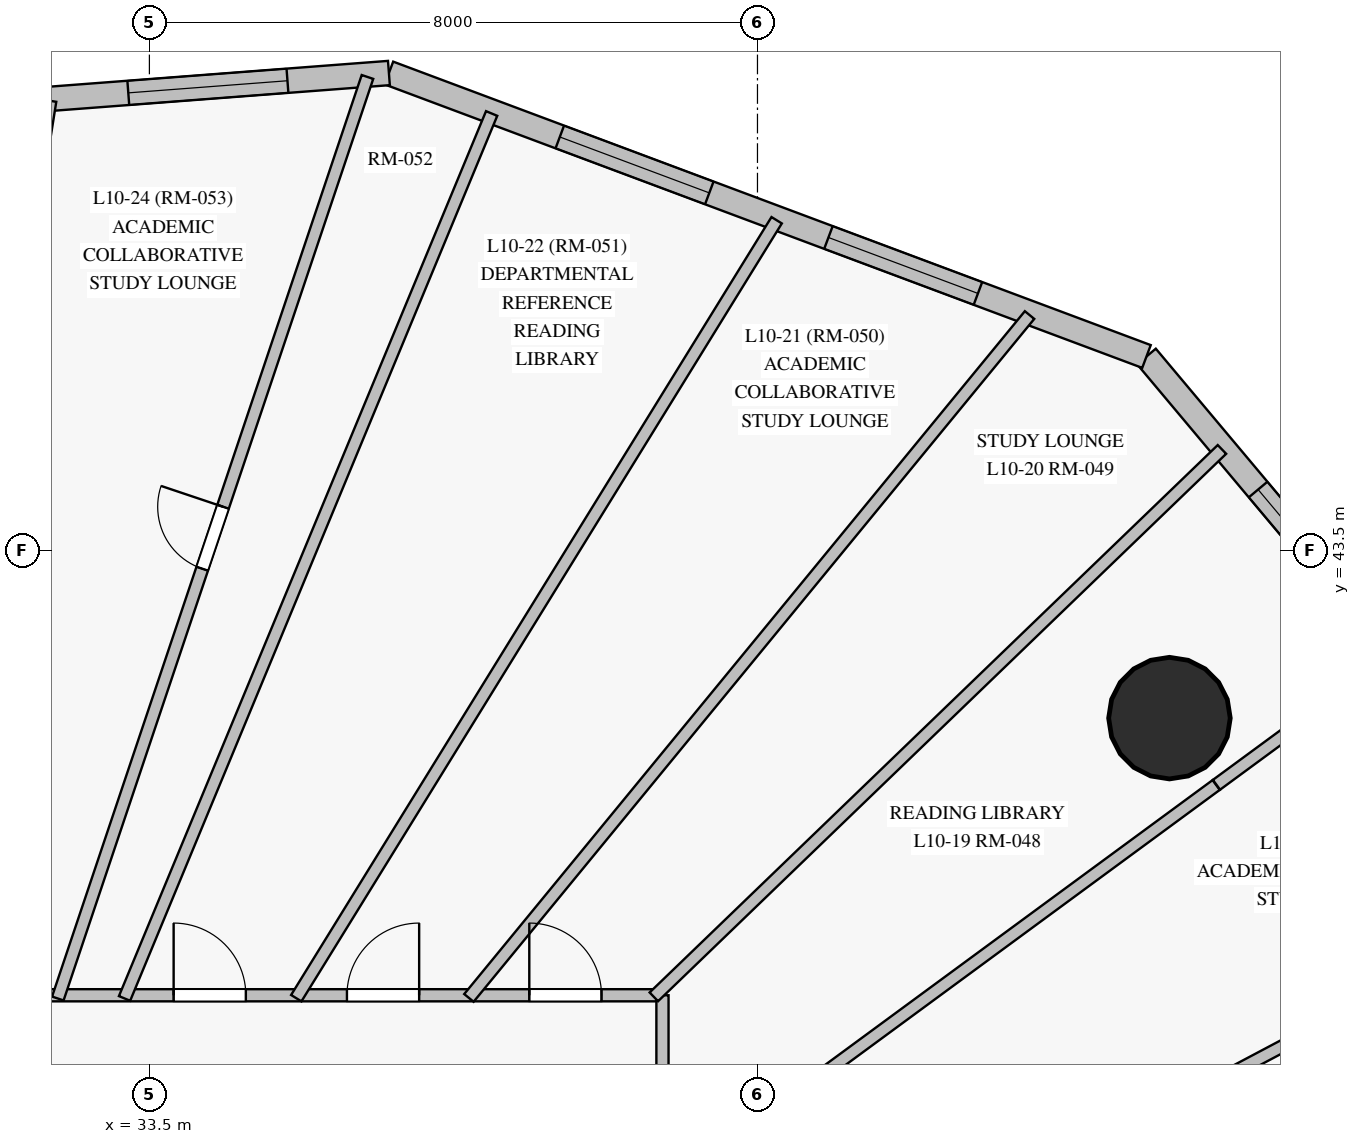
"""IFC4 building model, lengths in metres.
Left out: names, types, materials, properties, quantities, classifications, styles, units other than length and angle.
Written with IfcOpenShell. Run it as: python <this file> out.ifc"""

import sys

from ifc_helpers import new_model, si_unit, direction, frame, frame_2d, origin, origin_with_axes, origin_2d, place, context, subcontext, project, spatial, rectangle, circle, extrude, source, transform, mapped, element, fill, save


model = new_model("IFC4")
c1 = context("Model", 3, precision=1e-05, world=origin(), true_north=direction((0.0, 1.0)))
c2 = subcontext(c1, "Body", "Model", "MODEL_VIEW")
j1 = project(units=[si_unit("LENGTHUNIT", "METRE"), si_unit("PLANEANGLEUNIT", "RADIAN")], contexts=[c1])
p1 = place(None, origin())
s1 = spatial("IfcSite", under=j1, at=p1, CompositionType="ELEMENT")
p2 = place(p1, origin())
s2 = spatial("IfcBuilding", under=s1, at=p2, CompositionType="ELEMENT")
p3 = place(p2, frame((0.0, 0.0, 40.9)))
s3 = spatial("IfcBuildingStorey", under=s2, at=p3, CompositionType="ELEMENT", Elevation=40.9)
m1 = source(origin_with_axes(), c2, "Body", "SweptSolid", [
    extrude(circle(Radius=0.8, at=origin_2d()), origin(), (0.0, 0.0, 1.0), 3.6),
])
p4 = place(p3, frame((46.92, 41.296, 0.0), z_axis=(0.0, 0.0, 1.0), x_axis=(1.0, 0.0, 0.0)))
e1 = element("IfcColumn", 1, at=p4, inside=s3, PredefinedType="COLUMN", context=c2, shape_type="MappedRepresentation", body=[
    mapped(m1, transform((0.0, 0.0, 0.0), scale=1.0)),
])
p5 = place(p3, frame((55.11, 35.932, 0.0), z_axis=(0.0, 0.0, 1.0), x_axis=(-0.642710935311, 0.766108774021, 0.0)))
e2 = element("IfcWall", 2, at=p5, inside=s3, PredefinedType="SOLIDWALL", context=c2, shape_type="SweptSolid", body=[
    extrude(rectangle(XDim=13.212, YDim=0.32, at=frame_2d((6.606, 0.0))), origin(), (0.0, 0.0, 1.0), 3.35),
])
p6 = place(p5, frame((1.92, 0.0, 0.85)))
e3 = element("IfcOpeningElement", 3, at=p6, cuts=e2, PredefinedType="OPENING", context=c2, shape_type="SweptSolid", body=[
    extrude(rectangle(XDim=1.8, YDim=1.85, at=frame_2d((0.9, 0.925))), frame((0.0, 0.17, 0.0), z_axis=(0.0, -1.0, 0.0), x_axis=(1.0, 0.0, 0.0)), (0.0, 0.0, 1.0), 0.34),
])
p7 = place(p5, frame((5.094, 0.0, 0.85)))
e4 = element("IfcOpeningElement", 4, at=p7, cuts=e2, PredefinedType="OPENING", context=c2, shape_type="SweptSolid", body=[
    extrude(rectangle(XDim=2.1, YDim=1.95, at=frame_2d((1.05, 0.975))), frame((0.0, 0.17, 0.0), z_axis=(0.0, -1.0, 0.0), x_axis=(1.0, 0.0, 0.0)), (0.0, 0.0, 1.0), 0.34),
])
p8 = place(p5, frame((8.828, 0.0, 0.85)))
e5 = element("IfcOpeningElement", 5, at=p8, cuts=e2, PredefinedType="OPENING", context=c2, shape_type="SweptSolid", body=[
    extrude(rectangle(XDim=2.1, YDim=1.95, at=frame_2d((1.05, 0.975))), frame((0.0, 0.17, 0.0), z_axis=(0.0, -1.0, 0.0), x_axis=(1.0, 0.0, 0.0)), (0.0, 0.0, 1.0), 0.34),
])
p9 = place(p3, frame((46.618, 46.054, 0.0), z_axis=(0.0, 0.0, 1.0), x_axis=(-0.936577845609, 0.350459611246, 0.0)))
e6 = element("IfcWall", 6, at=p9, inside=s3, PredefinedType="SOLIDWALL", context=c2, shape_type="SweptSolid", body=[
    extrude(rectangle(XDim=10.642, YDim=0.32, at=frame_2d((5.321, 0.0))), origin(), (0.0, 0.0, 1.0), 3.35),
])
p10 = place(p9, frame((2.368, 0.0, 0.85)))
e7 = element("IfcOpeningElement", 7, at=p10, cuts=e6, PredefinedType="OPENING", context=c2, shape_type="SweptSolid", body=[
    extrude(rectangle(XDim=2.1, YDim=1.95, at=frame_2d((1.05, 0.975))), frame((0.0, 0.17, 0.0), z_axis=(0.0, -1.0, 0.0), x_axis=(1.0, 0.0, 0.0)), (0.0, 0.0, 1.0), 0.34),
])
p11 = place(p9, frame((6.141, 0.0, 0.85)))
e8 = element("IfcOpeningElement", 8, at=p11, cuts=e6, PredefinedType="OPENING", context=c2, shape_type="SweptSolid", body=[
    extrude(rectangle(XDim=2.1, YDim=1.95, at=frame_2d((1.05, 0.975))), frame((0.0, 0.17, 0.0), z_axis=(0.0, -1.0, 0.0), x_axis=(1.0, 0.0, 0.0)), (0.0, 0.0, 1.0), 0.34),
])
p12 = place(p3, frame((36.651, 49.783, 0.0), z_axis=(0.0, 0.0, 1.0), x_axis=(-0.997110035998, -0.075970889897, 0.0)))
e9 = element("IfcWall", 9, at=p12, inside=s3, PredefinedType="SOLIDWALL", context=c2, shape_type="SweptSolid", body=[
    extrude(rectangle(XDim=15.464, YDim=0.32, at=frame_2d((7.732, 0.0))), origin(), (0.0, 0.0, 1.0), 3.35),
])
p13 = place(p12, frame((1.339, 0.0, 0.85)))
e10 = element("IfcOpeningElement", 10, at=p13, cuts=e9, PredefinedType="OPENING", context=c2, shape_type="SweptSolid", body=[
    extrude(rectangle(XDim=2.1, YDim=1.95, at=frame_2d((1.05, 0.975))), frame((0.0, 0.17, 0.0), z_axis=(0.0, -1.0, 0.0), x_axis=(1.0, 0.0, 0.0)), (0.0, 0.0, 1.0), 0.34),
])
p14 = place(p12, frame((5.981, 0.0, 0.85)))
e11 = element("IfcOpeningElement", 11, at=p14, cuts=e9, PredefinedType="OPENING", context=c2, shape_type="SweptSolid", body=[
    extrude(rectangle(XDim=2.1, YDim=1.95, at=frame_2d((1.05, 0.975))), frame((0.0, 0.17, 0.0), z_axis=(0.0, -1.0, 0.0), x_axis=(1.0, 0.0, 0.0)), (0.0, 0.0, 1.0), 0.34),
])
p15 = place(p12, frame((10.331, 0.0, 0.85)))
e12 = element("IfcOpeningElement", 12, at=p15, cuts=e9, PredefinedType="OPENING", context=c2, shape_type="SweptSolid", body=[
    extrude(rectangle(XDim=2.1, YDim=1.95, at=frame_2d((1.05, 0.975))), frame((0.0, 0.17, 0.0), z_axis=(0.0, -1.0, 0.0), x_axis=(1.0, 0.0, 0.0)), (0.0, 0.0, 1.0), 0.34),
])
p16 = place(p3, frame((10.5, 37.65, 0.0), z_axis=(0.0, 0.0, 1.0), x_axis=(1.0, 0.0, 0.0)))
e13 = element("IfcWall", 13, at=p16, inside=s3, PredefinedType="PARTITIONING", context=c2, shape_type="SweptSolid", body=[
    extrude(rectangle(XDim=29.75, YDim=0.16, at=frame_2d((14.875, 0.0))), origin(), (0.0, 0.0, 1.0), 2.75),
])
p17 = place(p16, frame((27.998, 0.0, 0.0)))
e14 = element("IfcOpeningElement", 14, at=p17, cuts=e13, PredefinedType="OPENING", context=c2, shape_type="SweptSolid", body=[
    extrude(rectangle(XDim=0.95, YDim=2.15, at=frame_2d((0.475, 1.075))), frame((0.0, 0.09, 0.0), z_axis=(0.0, -1.0, 0.0), x_axis=(1.0, 0.0, 0.0)), (0.0, 0.0, 1.0), 0.18),
])
p18 = place(p16, frame((25.599, 0.0, 0.0)))
e15 = element("IfcOpeningElement", 15, at=p18, cuts=e13, PredefinedType="OPENING", context=c2, shape_type="SweptSolid", body=[
    extrude(rectangle(XDim=0.95, YDim=2.15, at=frame_2d((0.475, 1.075))), frame((0.0, 0.09, 0.0), z_axis=(0.0, -1.0, 0.0), x_axis=(1.0, 0.0, 0.0)), (0.0, 0.0, 1.0), 0.18),
])
p19 = place(p16, frame((23.319, 0.0, 0.0)))
e16 = element("IfcOpeningElement", 16, at=p19, cuts=e13, PredefinedType="OPENING", context=c2, shape_type="SweptSolid", body=[
    extrude(rectangle(XDim=0.95, YDim=2.15, at=frame_2d((0.475, 1.075))), frame((0.0, 0.09, 0.0), z_axis=(0.0, -1.0, 0.0), x_axis=(1.0, 0.0, 0.0)), (0.0, 0.0, 1.0), 0.18),
])
p20 = place(p16, frame((20.597, 0.0, 0.0)))
e17 = element("IfcOpeningElement", 17, at=p20, cuts=e13, PredefinedType="OPENING", context=c2, shape_type="SweptSolid", body=[
    extrude(rectangle(XDim=0.95, YDim=2.15, at=frame_2d((0.475, 1.075))), frame((0.0, 0.09, 0.0), z_axis=(0.0, -1.0, 0.0), x_axis=(1.0, 0.0, 0.0)), (0.0, 0.0, 1.0), 0.18),
])
p21 = place(p16, frame((18.611, 0.0, 0.0)))
e18 = element("IfcOpeningElement", 18, at=p21, cuts=e13, PredefinedType="OPENING", context=c2, shape_type="SweptSolid", body=[
    extrude(rectangle(XDim=0.95, YDim=2.15, at=frame_2d((0.475, 1.075))), frame((0.0, 0.09, 0.0), z_axis=(0.0, -1.0, 0.0), x_axis=(1.0, 0.0, 0.0)), (0.0, 0.0, 1.0), 0.18),
])
p22 = place(p16, frame((16.123, 0.0, 0.0)))
e19 = element("IfcOpeningElement", 19, at=p22, cuts=e13, PredefinedType="OPENING", context=c2, shape_type="SweptSolid", body=[
    extrude(rectangle(XDim=0.95, YDim=2.15, at=frame_2d((0.475, 1.075))), frame((0.0, 0.09, 0.0), z_axis=(0.0, -1.0, 0.0), x_axis=(1.0, 0.0, 0.0)), (0.0, 0.0, 1.0), 0.18),
])
p23 = place(p16, frame((12.996, 0.0, 0.0)))
e20 = element("IfcOpeningElement", 20, at=p23, cuts=e13, PredefinedType="OPENING", context=c2, shape_type="SweptSolid", body=[
    extrude(rectangle(XDim=0.95, YDim=2.15, at=frame_2d((0.475, 1.075))), frame((0.0, 0.09, 0.0), z_axis=(0.0, -1.0, 0.0), x_axis=(1.0, 0.0, 0.0)), (0.0, 0.0, 1.0), 0.18),
])
p24 = place(p16, frame((10.46, 0.0, 0.0)))
e21 = element("IfcOpeningElement", 21, at=p24, cuts=e13, PredefinedType="OPENING", context=c2, shape_type="SweptSolid", body=[
    extrude(rectangle(XDim=0.95, YDim=2.15, at=frame_2d((0.475, 1.075))), frame((0.0, 0.09, 0.0), z_axis=(0.0, -1.0, 0.0), x_axis=(1.0, 0.0, 0.0)), (0.0, 0.0, 1.0), 0.18),
])
p25 = place(p16, frame((7.876, 0.0, 0.0)))
e22 = element("IfcOpeningElement", 22, at=p25, cuts=e13, PredefinedType="OPENING", context=c2, shape_type="SweptSolid", body=[
    extrude(rectangle(XDim=0.95, YDim=2.15, at=frame_2d((0.475, 1.075))), frame((0.0, 0.09, 0.0), z_axis=(0.0, -1.0, 0.0), x_axis=(1.0, 0.0, 0.0)), (0.0, 0.0, 1.0), 0.18),
])
p26 = place(p16, frame((6.748, 0.0, 0.0)))
e23 = element("IfcOpeningElement", 23, at=p26, cuts=e13, PredefinedType="OPENING", context=c2, shape_type="SweptSolid", body=[
    extrude(rectangle(XDim=0.95, YDim=2.15, at=frame_2d((0.475, 1.075))), frame((0.0, 0.09, 0.0), z_axis=(0.0, -1.0, 0.0), x_axis=(1.0, 0.0, 0.0)), (0.0, 0.0, 1.0), 0.18),
])
p27 = place(p16, frame((5.623, 0.0, 0.0)))
e24 = element("IfcOpeningElement", 24, at=p27, cuts=e13, PredefinedType="OPENING", context=c2, shape_type="SweptSolid", body=[
    extrude(rectangle(XDim=0.95, YDim=2.15, at=frame_2d((0.475, 1.075))), frame((0.0, 0.09, 0.0), z_axis=(0.0, -1.0, 0.0), x_axis=(1.0, 0.0, 0.0)), (0.0, 0.0, 1.0), 0.18),
])
p28 = place(p3, frame((40.25, 37.65, 0.0), z_axis=(0.0, 0.0, 1.0), x_axis=(0.0, -1.0, 0.0)))
e25 = element("IfcWall", 25, at=p28, inside=s3, PredefinedType="PARTITIONING", context=c2, shape_type="SweptSolid", body=[
    extrude(rectangle(XDim=22.3, YDim=0.16, at=frame_2d((11.15, 0.0))), origin(), (0.0, 0.0, 1.0), 2.75),
])
p29 = place(p28, frame((16.34, 0.0, 0.0)))
e26 = element("IfcOpeningElement", 26, at=p29, cuts=e25, PredefinedType="OPENING", context=c2, shape_type="SweptSolid", body=[
    extrude(rectangle(XDim=0.95, YDim=2.15, at=frame_2d((0.475, 1.075))), frame((0.0, 0.09, 0.0), z_axis=(0.0, -1.0, 0.0), x_axis=(1.0, 0.0, 0.0)), (0.0, 0.0, 1.0), 0.18),
])
p30 = place(p28, frame((14.02, 0.0, 0.0)))
e27 = element("IfcOpeningElement", 27, at=p30, cuts=e25, PredefinedType="OPENING", context=c2, shape_type="SweptSolid", body=[
    extrude(rectangle(XDim=0.95, YDim=2.15, at=frame_2d((0.475, 1.075))), frame((0.0, 0.09, 0.0), z_axis=(0.0, -1.0, 0.0), x_axis=(1.0, 0.0, 0.0)), (0.0, 0.0, 1.0), 0.18),
])
p31 = place(p28, frame((11.065, 0.0, 0.0)))
e28 = element("IfcOpeningElement", 28, at=p31, cuts=e25, PredefinedType="OPENING", context=c2, shape_type="SweptSolid", body=[
    extrude(rectangle(XDim=0.95, YDim=2.15, at=frame_2d((0.475, 1.075))), frame((0.0, 0.09, 0.0), z_axis=(0.0, -1.0, 0.0), x_axis=(1.0, 0.0, 0.0)), (0.0, 0.0, 1.0), 0.18),
])
p32 = place(p28, frame((9.252, 0.0, 0.0)))
e29 = element("IfcOpeningElement", 29, at=p32, cuts=e25, PredefinedType="OPENING", context=c2, shape_type="SweptSolid", body=[
    extrude(rectangle(XDim=0.95, YDim=2.15, at=frame_2d((0.475, 1.075))), frame((0.0, 0.09, 0.0), z_axis=(0.0, -1.0, 0.0), x_axis=(1.0, 0.0, 0.0)), (0.0, 0.0, 1.0), 0.18),
])
p33 = place(p28, frame((3.54, 0.0, 0.0)))
e30 = element("IfcOpeningElement", 30, at=p33, cuts=e25, PredefinedType="OPENING", context=c2, shape_type="SweptSolid", body=[
    extrude(rectangle(XDim=0.95, YDim=2.15, at=frame_2d((0.475, 1.075))), frame((0.0, 0.09, 0.0), z_axis=(0.0, -1.0, 0.0), x_axis=(1.0, 0.0, 0.0)), (0.0, 0.0, 1.0), 0.18),
])
p34 = place(p28, frame((0.96, 0.0, 0.0)))
e31 = element("IfcOpeningElement", 31, at=p34, cuts=e25, PredefinedType="OPENING", context=c2, shape_type="SweptSolid", body=[
    extrude(rectangle(XDim=0.95, YDim=2.15, at=frame_2d((0.475, 1.075))), frame((0.0, 0.09, 0.0), z_axis=(0.0, -1.0, 0.0), x_axis=(1.0, 0.0, 0.0)), (0.0, 0.0, 1.0), 0.18),
])
p35 = place(p28, frame((12.837, 0.0, 0.0)))
e32 = element("IfcOpeningElement", 32, at=p35, cuts=e25, PredefinedType="OPENING", context=c2, shape_type="SweptSolid", body=[
    extrude(rectangle(XDim=0.95, YDim=2.15, at=frame_2d((0.475, 1.075))), frame((0.0, 0.09, 0.0), z_axis=(0.0, -1.0, 0.0), x_axis=(1.0, 0.0, 0.0)), (0.0, 0.0, 1.0), 0.18),
])
p36 = place(p28, frame((17.465, 0.0, 0.0)))
e33 = element("IfcOpeningElement", 33, at=p36, cuts=e25, PredefinedType="OPENING", context=c2, shape_type="SweptSolid", body=[
    extrude(rectangle(XDim=0.95, YDim=2.15, at=frame_2d((0.475, 1.075))), frame((0.0, 0.09, 0.0), z_axis=(0.0, -1.0, 0.0), x_axis=(1.0, 0.0, 0.0)), (0.0, 0.0, 1.0), 0.18),
])
p37 = place(p28, frame((7.605, 0.0, 0.0)))
e34 = element("IfcOpeningElement", 34, at=p37, cuts=e25, PredefinedType="OPENING", context=c2, shape_type="SweptSolid", body=[
    extrude(rectangle(XDim=0.86, YDim=2.04, at=frame_2d((0.43, 1.02))), frame((0.0, 0.09, 0.0), z_axis=(0.0, -1.0, 0.0), x_axis=(1.0, 0.0, 0.0)), (0.0, 0.0, 1.0), 0.18),
])
p38 = place(p3, frame((40.222, 31.278, 0.0), z_axis=(0.0, 0.0, 1.0), x_axis=(0.924216059617, 0.381869971517, 0.0)))
e35 = element("IfcWall", 35, at=p38, inside=s3, PredefinedType="PARTITIONING", context=c2, shape_type="SweptSolid", body=[
    extrude(rectangle(XDim=15.069, YDim=0.16, at=frame_2d((7.535, 0.0))), origin(), (0.0, 0.0, 1.0), 3.35),
])
p39 = place(p3, frame((40.223, 32.643, 0.0), z_axis=(0.0, 0.0, 1.0), x_axis=(0.88365057227, 0.46814705609, 0.0)))
e36 = element("IfcWall", 36, at=p39, inside=s3, PredefinedType="PARTITIONING", context=c2, shape_type="SweptSolid", body=[
    extrude(rectangle(XDim=13.797, YDim=0.16, at=frame_2d((6.898, 0.0))), origin(), (0.0, 0.0, 1.0), 3.35),
])
p40 = place(p39, frame((6.469, 0.0, 0.0)))
e37 = element("IfcOpeningElement", 37, at=p40, cuts=e36, PredefinedType="OPENING", context=c2, shape_type="SweptSolid", body=[
    extrude(rectangle(XDim=0.86, YDim=2.04, at=frame_2d((0.43, 1.02))), frame((0.0, 0.09, 0.0), z_axis=(0.0, -1.0, 0.0), x_axis=(1.0, 0.0, 0.0)), (0.0, 0.0, 1.0), 0.18),
])
p41 = place(p3, frame((32.295, 37.607, 0.0), z_axis=(0.0, 0.0, 1.0), x_axis=(0.318505986537, 0.947920849301, 0.0)))
e38 = element("IfcWall", 38, at=p41, inside=s3, PredefinedType="PARTITIONING", context=c2, shape_type="SweptSolid", body=[
    extrude(rectangle(XDim=12.79, YDim=0.16, at=frame_2d((6.395, 0.0))), origin(), (0.0, 0.0, 1.0), 3.35),
])
p42 = place(p41, frame((5.965, 0.0, 0.0)))
e39 = element("IfcOpeningElement", 39, at=p42, cuts=e38, PredefinedType="OPENING", context=c2, shape_type="SweptSolid", body=[
    extrude(rectangle(XDim=0.86, YDim=2.04, at=frame_2d((0.43, 1.02))), frame((0.0, 0.09, 0.0), z_axis=(0.0, -1.0, 0.0), x_axis=(1.0, 0.0, 0.0)), (0.0, 0.0, 1.0), 0.18),
])
p43 = place(p3, frame((33.173, 37.608, 0.0), z_axis=(0.0, 0.0, 1.0), x_axis=(0.383169413705, 0.923678082668, 0.0)))
e40 = element("IfcWall", 40, at=p43, inside=s3, PredefinedType="PARTITIONING", context=c2, shape_type="SweptSolid", body=[
    extrude(rectangle(XDim=12.604, YDim=0.16, at=frame_2d((6.302, 0.0))), origin(), (0.0, 0.0, 1.0), 3.35),
])
p44 = place(p3, frame((35.432, 37.612, 0.0), z_axis=(0.0, 0.0, 1.0), x_axis=(0.525422876005, 0.850841231588, 0.0)))
e41 = element("IfcWall", 41, at=p44, inside=s3, PredefinedType="PARTITIONING", context=c2, shape_type="SweptSolid", body=[
    extrude(rectangle(XDim=12.029, YDim=0.16, at=frame_2d((6.014, 0.0))), origin(), (0.0, 0.0, 1.0), 3.35),
])
p45 = place(p3, frame((30.323, 37.606, 0.0), z_axis=(0.0, 0.0, 1.0), x_axis=(0.156643954474, 0.987655137954, 0.0)))
e42 = element("IfcWall", 42, at=p45, inside=s3, PredefinedType="PARTITIONING", context=c2, shape_type="SweptSolid", body=[
    extrude(rectangle(XDim=11.959, YDim=0.16, at=frame_2d((5.979, 0.0))), origin(), (0.0, 0.0, 1.0), 3.35),
])
p46 = place(p3, frame((37.704, 37.615, 0.0), z_axis=(0.0, 0.0, 1.0), x_axis=(0.634552182482, 0.772880021547, 0.0)))
e43 = element("IfcWall", 43, at=p46, inside=s3, PredefinedType="PARTITIONING", context=c2, shape_type="SweptSolid", body=[
    extrude(rectangle(XDim=11.624, YDim=0.16, at=frame_2d((5.812, 0.0))), origin(), (0.0, 0.0, 1.0), 3.35),
])
p47 = place(p3, frame((40.137, 37.629, 0.0), z_axis=(0.0, 0.0, 1.0), x_axis=(0.720098619119, 0.693871730757, 0.0)))
e44 = element("IfcWall", 44, at=p47, inside=s3, PredefinedType="PARTITIONING", context=c2, shape_type="SweptSolid", body=[
    extrude(rectangle(XDim=10.379, YDim=0.16, at=frame_2d((5.19, 0.0))), origin(), (0.0, 0.0, 1.0), 3.35),
])
p48 = place(p3, frame((40.214, 35.035, 0.0), z_axis=(0.0, 0.0, 1.0), x_axis=(0.805769809624, 0.59222885264, 0.0)))
e45 = element("IfcWall", 45, at=p48, inside=s3, PredefinedType="PARTITIONING", context=c2, shape_type="SweptSolid", body=[
    extrude(rectangle(XDim=9.086, YDim=0.16, at=frame_2d((4.543, 0.0))), origin(), (0.0, 0.0, 1.0), 3.35),
])
p49 = place(p3, frame((47.539, 40.419, 0.0), z_axis=(0.0, 0.0, 1.0), x_axis=(0.805763100635, 0.592237980592, 0.0)))
e46 = element("IfcWall", 46, at=p49, inside=s3, PredefinedType="PARTITIONING", context=c2, shape_type="SweptSolid", body=[
    extrude(rectangle(XDim=2.904, YDim=0.16, at=frame_2d((1.452, 0.0))), origin(), (0.0, 0.0, 1.0), 3.35),
])
m2 = source(origin_with_axes(), c2, "Body", "SweptSolid", [
    extrude(rectangle(XDim=2.1, YDim=1.95, at=frame_2d((1.05, 0.975))), frame((0.0, 0.03, 0.0), z_axis=(0.0, -1.0, 0.0), x_axis=(1.0, 0.0, 0.0)), (0.0, 0.0, 1.0), 0.06),
])
p50 = place(p8, origin())
e47 = element("IfcWindow", 47, at=p50, inside=s3, PartitioningType="SINGLE_PANEL", PredefinedType="WINDOW", context=c2, shape_type="MappedRepresentation", body=[
    mapped(m2, transform((0.0, 0.0, 0.0), scale=1.0)),
])
fill(e5, e47)
p51 = place(p10, origin())
e48 = element("IfcWindow", 48, at=p51, inside=s3, PartitioningType="SINGLE_PANEL", PredefinedType="WINDOW", context=c2, shape_type="MappedRepresentation", body=[
    mapped(m2, transform((0.0, 0.0, 0.0), scale=1.0)),
])
fill(e7, e48)
p52 = place(p11, origin())
e49 = element("IfcWindow", 49, at=p52, inside=s3, PartitioningType="SINGLE_PANEL", PredefinedType="WINDOW", context=c2, shape_type="MappedRepresentation", body=[
    mapped(m2, transform((0.0, 0.0, 0.0), scale=1.0)),
])
fill(e8, e49)
p53 = place(p13, origin())
e50 = element("IfcWindow", 50, at=p53, inside=s3, PartitioningType="SINGLE_PANEL", PredefinedType="WINDOW", context=c2, shape_type="MappedRepresentation", body=[
    mapped(m2, transform((0.0, 0.0, 0.0), scale=1.0)),
])
fill(e10, e50)
m3 = source(origin_with_axes(), c2, "Body", "SweptSolid", [
    extrude(rectangle(XDim=0.95, YDim=2.15, at=frame_2d((0.475, 1.075))), frame((0.0, 0.025, 0.0), z_axis=(0.0, -1.0, 0.0), x_axis=(1.0, 0.0, 0.0)), (0.0, 0.0, 1.0), 0.05),
])
p54 = place(p17, origin())
e51 = element("IfcDoor", 51, at=p54, inside=s3, OperationType="SINGLE_SWING_LEFT", PredefinedType="DOOR", context=c2, shape_type="MappedRepresentation", body=[
    mapped(m3, transform((0.0, 0.0, 0.0), scale=1.0)),
])
fill(e14, e51)
p55 = place(p18, origin())
e52 = element("IfcDoor", 52, at=p55, inside=s3, OperationType="SINGLE_SWING_RIGHT", PredefinedType="DOOR", context=c2, shape_type="MappedRepresentation", body=[
    mapped(m3, transform((0.0, 0.0, 0.0), scale=1.0)),
])
fill(e15, e52)
p56 = place(p19, origin())
e53 = element("IfcDoor", 53, at=p56, inside=s3, OperationType="SINGLE_SWING_LEFT", PredefinedType="DOOR", context=c2, shape_type="MappedRepresentation", body=[
    mapped(m3, transform((0.0, 0.0, 0.0), scale=1.0)),
])
fill(e16, e53)
m4 = source(origin_with_axes(), c2, "Body", "SweptSolid", [
    extrude(rectangle(XDim=0.86, YDim=2.04, at=frame_2d((0.43, 1.02))), frame((0.0, 0.025, 0.0), z_axis=(0.0, -1.0, 0.0), x_axis=(1.0, 0.0, 0.0)), (0.0, 0.0, 1.0), 0.05),
])
p57 = place(p42, origin())
e54 = element("IfcDoor", 54, at=p57, inside=s3, OperationType="SINGLE_SWING_RIGHT", PredefinedType="DOOR", context=c2, shape_type="MappedRepresentation", body=[
    mapped(m4, transform((0.0, 0.0, 0.0), scale=1.0)),
])
fill(e39, e54)
save(model, sys.argv[1])
